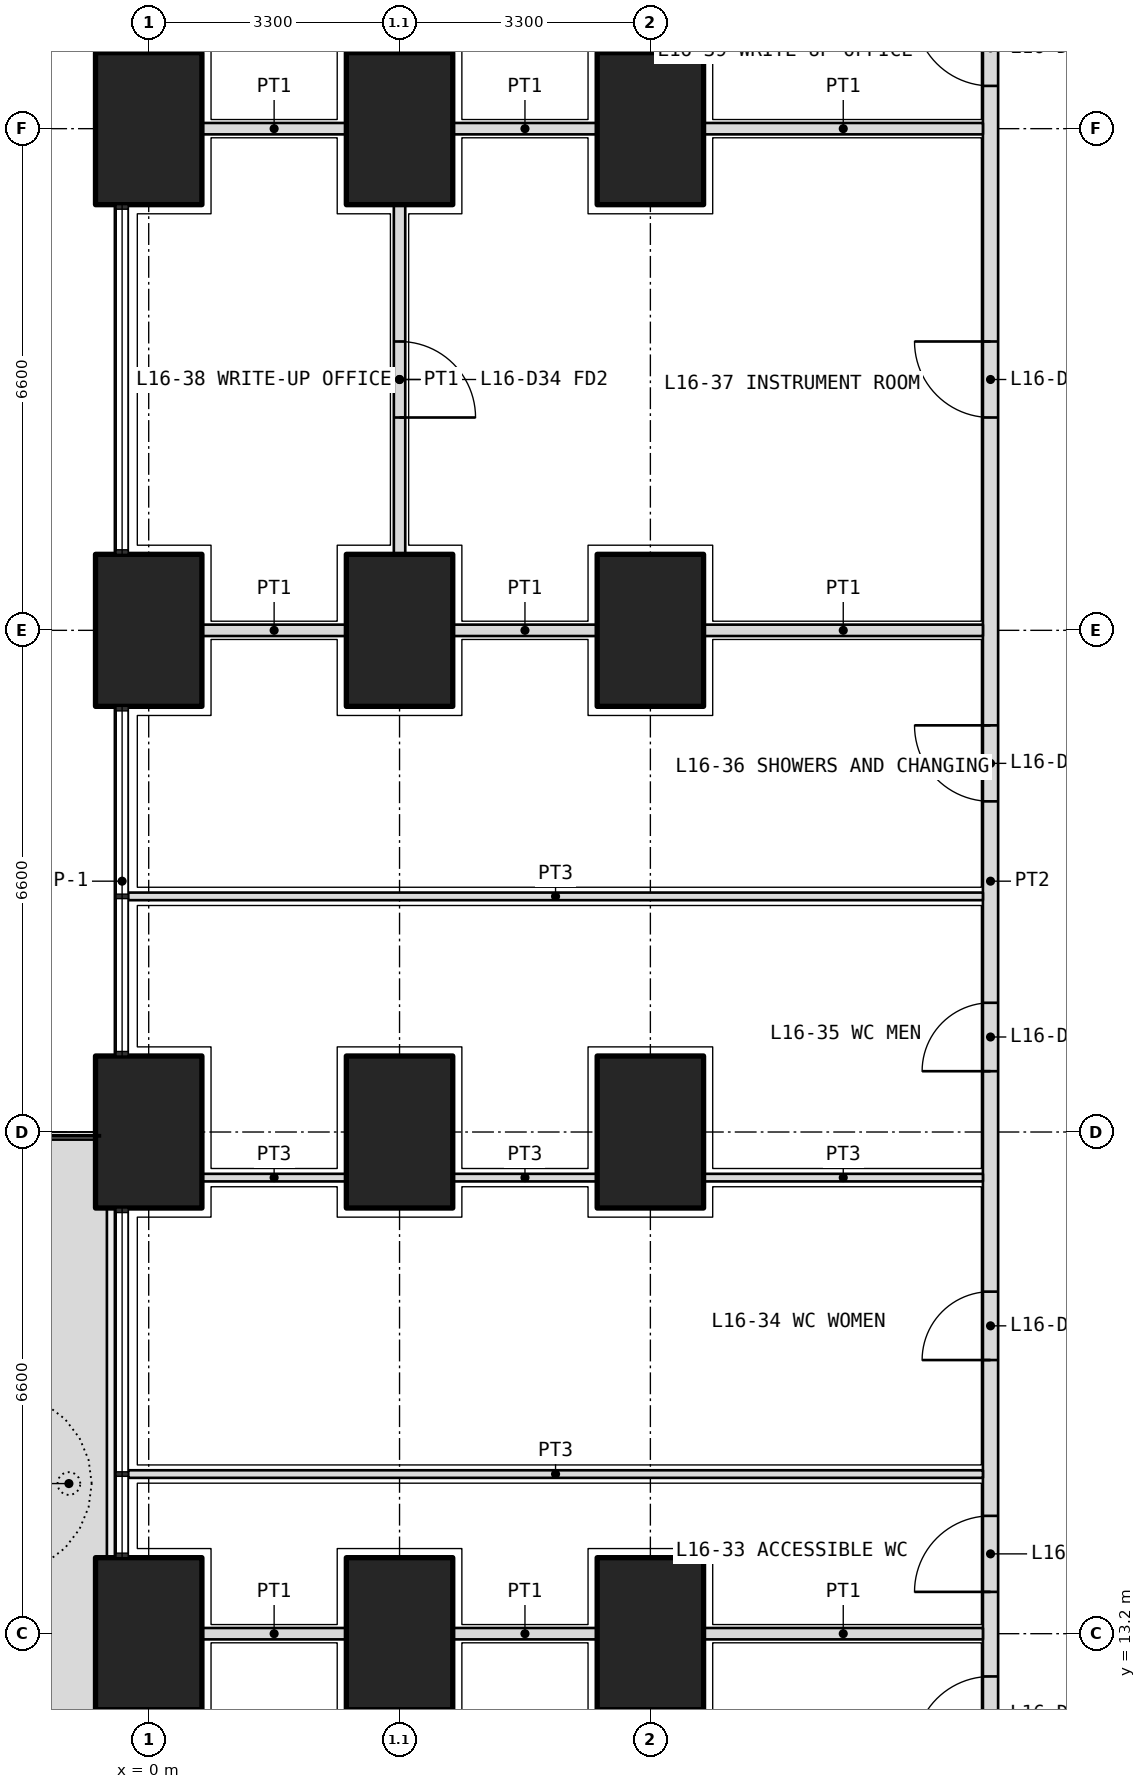
"""IFC4 building model, lengths in metres.
Left out: names, types, materials, properties, quantities, classifications, styles, units other than length and angle.
Written with IfcOpenShell. Run it as: python <this file> out.ifc"""

import sys

from ifc_helpers import new_model, si_unit, direction, frame, frame_2d, origin, origin_2d, place, context, subcontext, project, spatial, polyline, rectangle, outline, extrude, element, fill, save


model = new_model("IFC4")
c1 = context("Model", 3, precision=1e-05, world=origin(), true_north=direction((0.0, 1.0)))
c2 = subcontext(c1, "Body", "Model", "MODEL_VIEW")
j1 = project(units=[si_unit("LENGTHUNIT", "METRE"), si_unit("PLANEANGLEUNIT", "RADIAN")], contexts=[c1])
p1 = place(None, origin())
s1 = spatial("IfcSite", under=j1, at=p1, CompositionType="ELEMENT")
p2 = place(p1, origin())
s2 = spatial("IfcBuilding", under=s1, at=p2, CompositionType="ELEMENT")
p3 = place(p2, frame((0.0, 0.0, 71.7)))
s3 = spatial("IfcBuildingStorey", under=s2, at=p3, CompositionType="ELEMENT", Elevation=71.7)
for number, where, z_axis, x_axis in (
    (1, (0.0, 13.2, 0.0), (0.0, 0.0, 1.0), (0.0, 1.0, 0.0)),
    (2, (0.0, 19.8, 0.0), (0.0, 0.0, 1.0), (0.0, 1.0, 0.0)),
    (3, (0.0, 26.4, 0.0), (0.0, 0.0, 1.0), (0.0, 1.0, 0.0)),
    (4, (0.0, 33.0, 0.0), (0.0, 0.0, 1.0), (0.0, 1.0, 0.0)),
    (5, (3.3, 13.2, 0.0), (0.0, 0.0, 1.0), (0.0, 1.0, 0.0)),
    (6, (3.3, 19.8, 0.0), (0.0, 0.0, 1.0), (0.0, 1.0, 0.0)),
    (7, (3.3, 26.4, 0.0), (0.0, 0.0, 1.0), (0.0, 1.0, 0.0)),
    (8, (3.3, 33.0, 0.0), (0.0, 0.0, 1.0), (0.0, 1.0, 0.0)),
    (9, (6.6, 13.2, 0.0), (0.0, 0.0, 1.0), (0.0, 1.0, 0.0)),
    (10, (6.6, 19.8, 0.0), (0.0, 0.0, 1.0), (0.0, 1.0, 0.0)),
    (11, (6.6, 26.4, 0.0), (0.0, 0.0, 1.0), (0.0, 1.0, 0.0)),
    (12, (6.6, 33.0, 0.0), (0.0, 0.0, 1.0), (0.0, 1.0, 0.0)),
):
    element("IfcColumn", number, at=place(p3, frame(where, z_axis=z_axis, x_axis=x_axis)), inside=s3, PredefinedType="COLUMN", context=c2, shape_type="SweptSolid", body=[
        extrude(rectangle(XDim=2.0, YDim=1.4, at=origin_2d()), origin(), (0.0, 0.0, 1.0), 4.2),
    ])
p4 = place(p3, origin())
e13 = element("IfcWall", 13, at=p4, inside=s3, PredefinedType="USERDEFINED", context=c2, shape_type="SweptSolid", body=[
    extrude(outline(polyline([(-1.55, 10.65), (-0.55, 10.65), (-0.55, 19.7), (-1.55, 19.7), (-1.55, 10.65)]), holes=[polyline([(-1.4, 10.8), (-0.7, 10.8), (-0.7, 19.55), (-1.4, 19.55), (-1.4, 10.8)])]), origin(), (0.0, 0.0, 1.0), 1.05),
])
p5 = place(p3, frame((-0.35, 12.2, 0.0), z_axis=(0.0, 0.0, 1.0), x_axis=(0.0, -1.0, 0.0)))
e14 = element("IfcWall", 14, at=p5, inside=s3, PredefinedType="SOLIDWALL", context=c2, shape_type="SweptSolid", body=[
    extrude(rectangle(XDim=4.6, YDim=0.15, at=frame_2d((2.3, 0.0))), origin(), (0.0, 0.0, 1.0), 2.05),
])
p6 = place(p5, frame((1.05, 0.0, 0.0)))
e15 = element("IfcOpeningElement", 15, at=p6, cuts=e14, PredefinedType="OPENING", context=c2, shape_type="SweptSolid", body=[
    extrude(rectangle(XDim=1.0, YDim=2.0, at=frame_2d((0.5, 1.0))), frame((0.0, 0.085, 0.0), z_axis=(0.0, -1.0, 0.0), x_axis=(1.0, 0.0, 0.0)), (0.0, 0.0, 1.0), 0.17),
])
p7 = place(p5, frame((0.1, 0.0, 0.1)))
e16 = element("IfcOpeningElement", 16, at=p7, cuts=e14, PredefinedType="OPENING", context=c2, shape_type="SweptSolid", body=[
    extrude(rectangle(XDim=0.85, YDim=1.65, at=frame_2d((0.425, 0.825))), frame((0.0, 0.085, 0.0), z_axis=(0.0, -1.0, 0.0), x_axis=(1.0, 0.0, 0.0)), (0.0, 0.0, 1.0), 0.17),
])
p8 = place(p5, frame((2.55, 0.0, 0.1)))
e17 = element("IfcOpeningElement", 17, at=p8, cuts=e14, PredefinedType="OPENING", context=c2, shape_type="SweptSolid", body=[
    extrude(rectangle(XDim=1.95, YDim=1.65, at=frame_2d((0.975, 0.825))), frame((0.0, 0.085, 0.0), z_axis=(0.0, -1.0, 0.0), x_axis=(1.0, 0.0, 0.0)), (0.0, 0.0, 1.0), 0.17),
])
p9 = place(p3, frame((11.075, 11.175, 0.0), z_axis=(0.0, 0.0, 1.0), x_axis=(0.0, 1.0, 0.0)))
e18 = element("IfcWall", 18, at=p9, inside=s3, PredefinedType="PARTITIONING", context=c2, shape_type="SweptSolid", body=[
    extrude(rectangle(XDim=23.85, YDim=0.2, at=frame_2d((11.925, 0.0))), origin(), (0.0, 0.0, 1.0), 2.55),
])
p10 = place(p9, frame((0.462, 0.0, 0.0)))
e19 = element("IfcOpeningElement", 19, at=p10, cuts=e18, PredefinedType="OPENING", context=c2, shape_type="SweptSolid", body=[
    extrude(rectangle(XDim=1.0, YDim=2.1, at=frame_2d((0.5, 1.05))), frame((0.0, 0.11, 0.0), z_axis=(0.0, -1.0, 0.0), x_axis=(1.0, 0.0, 0.0)), (0.0, 0.0, 1.0), 0.22),
])
p11 = place(p9, frame((2.575, 0.0, 0.0)))
e20 = element("IfcOpeningElement", 20, at=p11, cuts=e18, PredefinedType="OPENING", context=c2, shape_type="SweptSolid", body=[
    extrude(rectangle(XDim=1.0, YDim=2.1, at=frame_2d((0.5, 1.05))), frame((0.0, 0.11, 0.0), z_axis=(0.0, -1.0, 0.0), x_axis=(1.0, 0.0, 0.0)), (0.0, 0.0, 1.0), 0.22),
])
p12 = place(p9, frame((5.625, 0.0, 0.0)))
e21 = element("IfcOpeningElement", 21, at=p12, cuts=e18, PredefinedType="OPENING", context=c2, shape_type="SweptSolid", body=[
    extrude(rectangle(XDim=0.9, YDim=2.1, at=frame_2d((0.45, 1.05))), frame((0.0, 0.11, 0.0), z_axis=(0.0, -1.0, 0.0), x_axis=(1.0, 0.0, 0.0)), (0.0, 0.0, 1.0), 0.22),
])
p13 = place(p9, frame((9.425, 0.0, 0.0)))
e22 = element("IfcOpeningElement", 22, at=p13, cuts=e18, PredefinedType="OPENING", context=c2, shape_type="SweptSolid", body=[
    extrude(rectangle(XDim=0.9, YDim=2.1, at=frame_2d((0.45, 1.05))), frame((0.0, 0.11, 0.0), z_axis=(0.0, -1.0, 0.0), x_axis=(1.0, 0.0, 0.0)), (0.0, 0.0, 1.0), 0.22),
])
p14 = place(p9, frame((12.975, 0.0, 0.0)))
e23 = element("IfcOpeningElement", 23, at=p14, cuts=e18, PredefinedType="OPENING", context=c2, shape_type="SweptSolid", body=[
    extrude(rectangle(XDim=1.0, YDim=2.1, at=frame_2d((0.5, 1.05))), frame((0.0, 0.11, 0.0), z_axis=(0.0, -1.0, 0.0), x_axis=(1.0, 0.0, 0.0)), (0.0, 0.0, 1.0), 0.22),
])
p15 = place(p9, frame((18.025, 0.0, 0.0)))
e24 = element("IfcOpeningElement", 24, at=p15, cuts=e18, PredefinedType="OPENING", context=c2, shape_type="SweptSolid", body=[
    extrude(rectangle(XDim=1.0, YDim=2.1, at=frame_2d((0.5, 1.05))), frame((0.0, 0.11, 0.0), z_axis=(0.0, -1.0, 0.0), x_axis=(1.0, 0.0, 0.0)), (0.0, 0.0, 1.0), 0.22),
])
p16 = place(p9, frame((22.387, 0.0, 0.0)))
e25 = element("IfcOpeningElement", 25, at=p16, cuts=e18, PredefinedType="OPENING", context=c2, shape_type="SweptSolid", body=[
    extrude(rectangle(XDim=1.0, YDim=2.1, at=frame_2d((0.5, 1.05))), frame((0.0, 0.11, 0.0), z_axis=(0.0, -1.0, 0.0), x_axis=(1.0, 0.0, 0.0)), (0.0, 0.0, 1.0), 0.22),
])
p17 = place(p3, frame((3.3, 32.0, 0.0), z_axis=(0.0, 0.0, 1.0), x_axis=(0.0, -1.0, 0.0)))
e26 = element("IfcWall", 26, at=p17, inside=s3, PredefinedType="PARTITIONING", context=c2, shape_type="SweptSolid", body=[
    extrude(rectangle(XDim=4.6, YDim=0.15, at=frame_2d((2.3, 0.0))), origin(), (0.0, 0.0, 1.0), 2.55),
])
p18 = place(p17, frame((1.8, 0.0, 0.0)))
e27 = element("IfcOpeningElement", 27, at=p18, cuts=e26, PredefinedType="OPENING", context=c2, shape_type="SweptSolid", body=[
    extrude(rectangle(XDim=1.0, YDim=2.1, at=frame_2d((0.5, 1.05))), frame((0.0, 0.085, 0.0), z_axis=(0.0, -1.0, 0.0), x_axis=(1.0, 0.0, 0.0)), (0.0, 0.0, 1.0), 0.17),
])
p19 = place(p3, frame((3.3, 12.2, 0.0), z_axis=(0.0, 0.0, 1.0), x_axis=(0.0, -1.0, 0.0)))
e28 = element("IfcWall", 28, at=p19, inside=s3, PredefinedType="PARTITIONING", context=c2, shape_type="SweptSolid", body=[
    extrude(rectangle(XDim=4.6, YDim=0.15, at=frame_2d((2.3, 0.0))), origin(), (0.0, 0.0, 1.0), 2.55),
])
p20 = place(p19, frame((3.35, 0.0, 0.0)))
e29 = element("IfcOpeningElement", 29, at=p20, cuts=e28, PredefinedType="OPENING", context=c2, shape_type="SweptSolid", body=[
    extrude(rectangle(XDim=1.0, YDim=2.1, at=frame_2d((0.5, 1.05))), frame((0.0, 0.085, 0.0), z_axis=(0.0, -1.0, 0.0), x_axis=(1.0, 0.0, 0.0)), (0.0, 0.0, 1.0), 0.17),
])
p21 = place(p3, frame((-0.27, 15.3, 0.0), z_axis=(0.0, 0.0, 1.0), x_axis=(1.0, 0.0, 0.0)))
e30 = element("IfcWall", 30, at=p21, inside=s3, PredefinedType="PARTITIONING", context=c2, shape_type="SweptSolid", body=[
    extrude(rectangle(XDim=11.245, YDim=0.1, at=frame_2d((5.623, 0.0))), origin(), (0.0, 0.0, 1.0), 3.85),
])
p22 = place(p3, frame((0.7, 19.2, 0.0), z_axis=(0.0, 0.0, 1.0), x_axis=(1.0, 0.0, 0.0)))
e31 = element("IfcWall", 31, at=p22, inside=s3, PredefinedType="PARTITIONING", context=c2, shape_type="SweptSolid", body=[
    extrude(rectangle(XDim=1.9, YDim=0.1, at=frame_2d((0.95, 0.0))), origin(), (0.0, 0.0, 1.0), 2.55),
])
p23 = place(p3, frame((4.0, 19.2, 0.0), z_axis=(0.0, 0.0, 1.0), x_axis=(1.0, 0.0, 0.0)))
e32 = element("IfcWall", 32, at=p23, inside=s3, PredefinedType="PARTITIONING", context=c2, shape_type="SweptSolid", body=[
    extrude(rectangle(XDim=1.9, YDim=0.1, at=frame_2d((0.95, 0.0))), origin(), (0.0, 0.0, 1.0), 2.55),
])
p24 = place(p3, frame((7.3, 19.2, 0.0), z_axis=(0.0, 0.0, 1.0), x_axis=(1.0, 0.0, 0.0)))
e33 = element("IfcWall", 33, at=p24, inside=s3, PredefinedType="PARTITIONING", context=c2, shape_type="SweptSolid", body=[
    extrude(rectangle(XDim=3.675, YDim=0.1, at=frame_2d((1.837, 0.0))), origin(), (0.0, 0.0, 1.0), 2.55),
])
p25 = place(p3, frame((-0.27, 22.9, 0.0), z_axis=(0.0, 0.0, 1.0), x_axis=(1.0, 0.0, 0.0)))
e34 = element("IfcWall", 34, at=p25, inside=s3, PredefinedType="PARTITIONING", context=c2, shape_type="SweptSolid", body=[
    extrude(rectangle(XDim=11.245, YDim=0.1, at=frame_2d((5.623, 0.0))), origin(), (0.0, 0.0, 1.0), 3.85),
])
p26 = place(p3, frame((0.7, 13.2, 0.0), z_axis=(0.0, 0.0, 1.0), x_axis=(1.0, 0.0, 0.0)))
e35 = element("IfcWall", 35, at=p26, inside=s3, PredefinedType="PARTITIONING", context=c2, shape_type="SweptSolid", body=[
    extrude(rectangle(XDim=1.9, YDim=0.15, at=frame_2d((0.95, 0.0))), origin(), (0.0, 0.0, 1.0), 2.55),
])
p27 = place(p3, frame((4.0, 13.2, 0.0), z_axis=(0.0, 0.0, 1.0), x_axis=(1.0, 0.0, 0.0)))
e36 = element("IfcWall", 36, at=p27, inside=s3, PredefinedType="PARTITIONING", context=c2, shape_type="SweptSolid", body=[
    extrude(rectangle(XDim=1.9, YDim=0.15, at=frame_2d((0.95, 0.0))), origin(), (0.0, 0.0, 1.0), 2.55),
])
p28 = place(p3, frame((7.3, 13.2, 0.0), z_axis=(0.0, 0.0, 1.0), x_axis=(1.0, 0.0, 0.0)))
e37 = element("IfcWall", 37, at=p28, inside=s3, PredefinedType="PARTITIONING", context=c2, shape_type="SweptSolid", body=[
    extrude(rectangle(XDim=3.675, YDim=0.15, at=frame_2d((1.837, 0.0))), origin(), (0.0, 0.0, 1.0), 2.55),
])
p29 = place(p3, frame((0.7, 26.4, 0.0), z_axis=(0.0, 0.0, 1.0), x_axis=(1.0, 0.0, 0.0)))
e38 = element("IfcWall", 38, at=p29, inside=s3, PredefinedType="PARTITIONING", context=c2, shape_type="SweptSolid", body=[
    extrude(rectangle(XDim=1.9, YDim=0.15, at=frame_2d((0.95, 0.0))), origin(), (0.0, 0.0, 1.0), 2.55),
])
p30 = place(p3, frame((4.0, 26.4, 0.0), z_axis=(0.0, 0.0, 1.0), x_axis=(1.0, 0.0, 0.0)))
e39 = element("IfcWall", 39, at=p30, inside=s3, PredefinedType="PARTITIONING", context=c2, shape_type="SweptSolid", body=[
    extrude(rectangle(XDim=1.9, YDim=0.15, at=frame_2d((0.95, 0.0))), origin(), (0.0, 0.0, 1.0), 2.55),
])
p31 = place(p3, frame((7.3, 26.4, 0.0), z_axis=(0.0, 0.0, 1.0), x_axis=(1.0, 0.0, 0.0)))
e40 = element("IfcWall", 40, at=p31, inside=s3, PredefinedType="PARTITIONING", context=c2, shape_type="SweptSolid", body=[
    extrude(rectangle(XDim=3.675, YDim=0.15, at=frame_2d((1.837, 0.0))), origin(), (0.0, 0.0, 1.0), 2.55),
])
p32 = place(p3, frame((0.7, 33.0, 0.0), z_axis=(0.0, 0.0, 1.0), x_axis=(1.0, 0.0, 0.0)))
e41 = element("IfcWall", 41, at=p32, inside=s3, PredefinedType="PARTITIONING", context=c2, shape_type="SweptSolid", body=[
    extrude(rectangle(XDim=1.9, YDim=0.15, at=frame_2d((0.95, 0.0))), origin(), (0.0, 0.0, 1.0), 2.55),
])
p33 = place(p3, frame((4.0, 33.0, 0.0), z_axis=(0.0, 0.0, 1.0), x_axis=(1.0, 0.0, 0.0)))
e42 = element("IfcWall", 42, at=p33, inside=s3, PredefinedType="PARTITIONING", context=c2, shape_type="SweptSolid", body=[
    extrude(rectangle(XDim=1.9, YDim=0.15, at=frame_2d((0.95, 0.0))), origin(), (0.0, 0.0, 1.0), 2.55),
])
p34 = place(p3, frame((7.3, 33.0, 0.0), z_axis=(0.0, 0.0, 1.0), x_axis=(1.0, 0.0, 0.0)))
e43 = element("IfcWall", 43, at=p34, inside=s3, PredefinedType="PARTITIONING", context=c2, shape_type="SweptSolid", body=[
    extrude(rectangle(XDim=3.675, YDim=0.15, at=frame_2d((1.837, 0.0))), origin(), (0.0, 0.0, 1.0), 2.55),
])
p35 = place(p10, origin())
e44 = element("IfcDoor", 44, at=p35, inside=s3, OperationType="SINGLE_SWING_LEFT", PredefinedType="DOOR", context=c2, shape_type="SweptSolid", body=[
    extrude(rectangle(XDim=1.0, YDim=2.1, at=frame_2d((0.5, 1.05))), frame((0.0, 0.025, 0.0), z_axis=(0.0, -1.0, 0.0), x_axis=(1.0, 0.0, 0.0)), (0.0, 0.0, 1.0), 0.05),
])
fill(e19, e44)
p36 = place(p11, origin())
e45 = element("IfcDoor", 45, at=p36, inside=s3, OperationType="SINGLE_SWING_LEFT", PredefinedType="DOOR", context=c2, shape_type="SweptSolid", body=[
    extrude(rectangle(XDim=1.0, YDim=2.1, at=frame_2d((0.5, 1.05))), frame((0.0, 0.025, 0.0), z_axis=(0.0, -1.0, 0.0), x_axis=(1.0, 0.0, 0.0)), (0.0, 0.0, 1.0), 0.05),
])
fill(e20, e45)
p37 = place(p12, origin())
e46 = element("IfcDoor", 46, at=p37, inside=s3, OperationType="SINGLE_SWING_LEFT", PredefinedType="DOOR", context=c2, shape_type="SweptSolid", body=[
    extrude(rectangle(XDim=0.9, YDim=2.1, at=frame_2d((0.45, 1.05))), frame((0.0, 0.025, 0.0), z_axis=(0.0, -1.0, 0.0), x_axis=(1.0, 0.0, 0.0)), (0.0, 0.0, 1.0), 0.05),
])
fill(e21, e46)
p38 = place(p13, origin())
e47 = element("IfcDoor", 47, at=p38, inside=s3, OperationType="SINGLE_SWING_LEFT", PredefinedType="DOOR", context=c2, shape_type="SweptSolid", body=[
    extrude(rectangle(XDim=0.9, YDim=2.1, at=frame_2d((0.45, 1.05))), frame((0.0, 0.025, 0.0), z_axis=(0.0, -1.0, 0.0), x_axis=(1.0, 0.0, 0.0)), (0.0, 0.0, 1.0), 0.05),
])
fill(e22, e47)
p39 = place(p14, origin())
e48 = element("IfcDoor", 48, at=p39, inside=s3, OperationType="SINGLE_SWING_RIGHT", PredefinedType="DOOR", context=c2, shape_type="SweptSolid", body=[
    extrude(rectangle(XDim=1.0, YDim=2.1, at=frame_2d((0.5, 1.05))), frame((0.0, 0.025, 0.0), z_axis=(0.0, -1.0, 0.0), x_axis=(1.0, 0.0, 0.0)), (0.0, 0.0, 1.0), 0.05),
])
fill(e23, e48)
p40 = place(p15, origin())
e49 = element("IfcDoor", 49, at=p40, inside=s3, OperationType="SINGLE_SWING_RIGHT", PredefinedType="DOOR", context=c2, shape_type="SweptSolid", body=[
    extrude(rectangle(XDim=1.0, YDim=2.1, at=frame_2d((0.5, 1.05))), frame((0.0, 0.025, 0.0), z_axis=(0.0, -1.0, 0.0), x_axis=(1.0, 0.0, 0.0)), (0.0, 0.0, 1.0), 0.05),
])
fill(e24, e49)
p41 = place(p18, origin())
e50 = element("IfcDoor", 50, at=p41, inside=s3, OperationType="SINGLE_SWING_RIGHT", PredefinedType="DOOR", context=c2, shape_type="SweptSolid", body=[
    extrude(rectangle(XDim=1.0, YDim=2.1, at=frame_2d((0.5, 1.05))), frame((0.0, 0.025, 0.0), z_axis=(0.0, -1.0, 0.0), x_axis=(1.0, 0.0, 0.0)), (0.0, 0.0, 1.0), 0.05),
])
fill(e27, e50)
p42 = place(p16, origin())
e51 = element("IfcDoor", 51, at=p42, inside=s3, OperationType="SINGLE_SWING_RIGHT", PredefinedType="DOOR", context=c2, shape_type="SweptSolid", body=[
    extrude(rectangle(XDim=1.0, YDim=2.1, at=frame_2d((0.5, 1.05))), frame((0.0, 0.025, 0.0), z_axis=(0.0, -1.0, 0.0), x_axis=(1.0, 0.0, 0.0)), (0.0, 0.0, 1.0), 0.05),
])
fill(e25, e51)
save(model, sys.argv[1])
